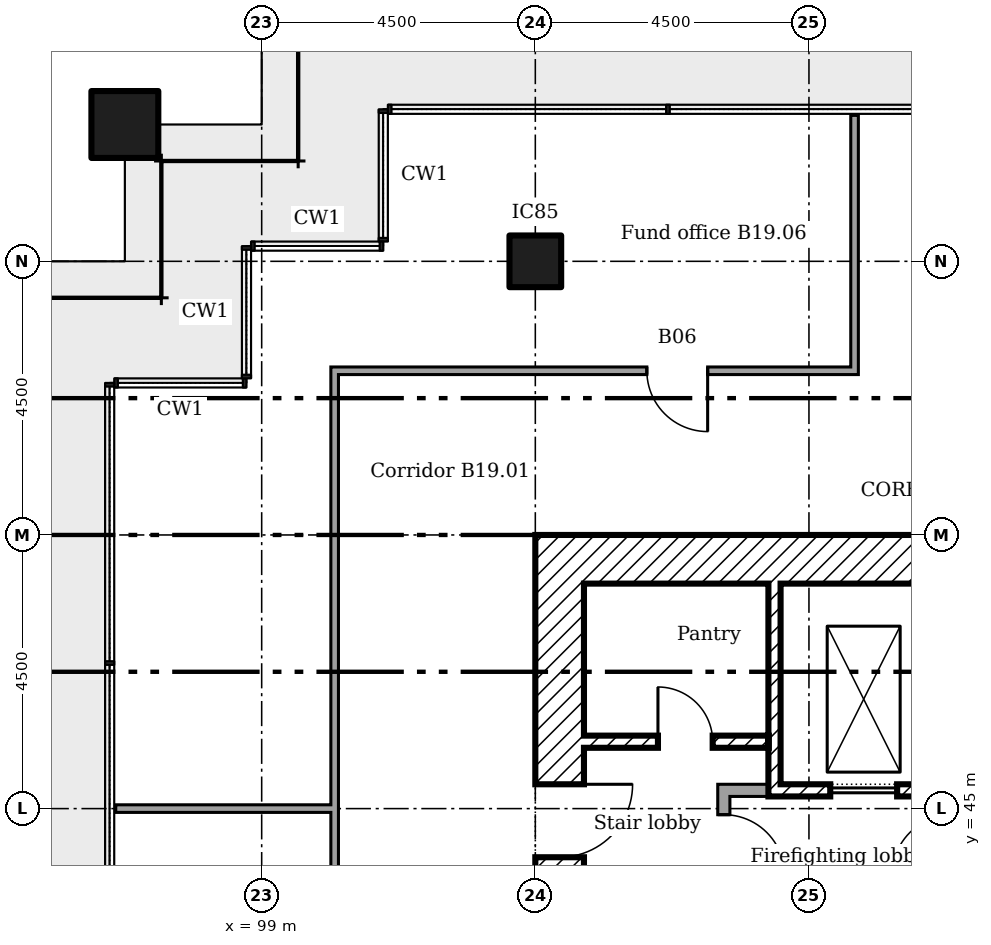
"""IFC4 building model, lengths in metres.
Left out: names, types, materials, properties, quantities, classifications, styles, units other than length and angle.
Written with IfcOpenShell. Run it as: python <this file> out.ifc"""

import sys

from ifc_helpers import new_model, si_unit, direction, frame, frame_2d, origin, origin_2d, place, context, subcontext, project, spatial, rectangle, extrude, element, fill, save


model = new_model("IFC4")
c1 = context("Model", 3, precision=1e-05, world=origin(), true_north=direction((0.0, 1.0)))
c2 = subcontext(c1, "Body", "Model", "MODEL_VIEW")
j1 = project(units=[si_unit("LENGTHUNIT", "METRE"), si_unit("PLANEANGLEUNIT", "RADIAN")], contexts=[c1])
p1 = place(None, origin())
s1 = spatial("IfcSite", under=j1, at=p1, CompositionType="ELEMENT")
p2 = place(p1, origin())
s2 = spatial("IfcBuilding", under=s1, at=p2, CompositionType="ELEMENT")
p3 = place(p2, frame((0.0, 0.0, 79.8)))
s3 = spatial("IfcBuildingStorey", under=s2, at=p3, CompositionType="ELEMENT", Elevation=79.8)
p4 = place(p3, frame((96.75, 56.25, 0.0)))
e1 = element("IfcColumn", 1, at=p4, inside=s3, PredefinedType="COLUMN", context=c2, shape_type="SweptSolid", body=[
    extrude(rectangle(XDim=1.1, YDim=1.1, at=origin_2d()), origin(), (0.0, 0.0, 1.0), 3.6),
])
p5 = place(p3, frame((103.5, 54.0, 0.0)))
e2 = element("IfcColumn", 2, at=p5, inside=s3, PredefinedType="COLUMN", context=c2, shape_type="SweptSolid", body=[
    extrude(rectangle(XDim=0.85, YDim=0.85, at=origin_2d()), origin(), (0.0, 0.0, 1.0), 3.6),
])
p6 = place(p3, frame((104.3, 49.1, 0.0)))
e3 = element("IfcWall", 3, at=p6, inside=s3, PredefinedType="SHEAR", context=c2, shape_type="SweptSolid", body=[
    extrude(rectangle(XDim=11.9, YDim=0.8, at=frame_2d((5.95, 0.0))), origin(), (0.0, 0.0, 1.0), 3.35),
])
p7 = place(p3, frame((103.9, 36.0, 0.0), z_axis=(0.0, 0.0, 1.0), x_axis=(0.0, 1.0, 0.0)))
e4 = element("IfcWall", 4, at=p7, inside=s3, PredefinedType="SHEAR", context=c2, shape_type="SweptSolid", body=[
    extrude(rectangle(XDim=13.5, YDim=0.8, at=frame_2d((6.75, 0.0))), origin(), (0.0, 0.0, 1.0), 3.35),
])
p8 = place(p7, frame((8.2, 0.0, 0.0)))
e5 = element("IfcOpeningElement", 5, at=p8, cuts=e4, PredefinedType="OPENING", context=c2, shape_type="SweptSolid", body=[
    extrude(rectangle(XDim=1.2, YDim=2.1, at=frame_2d((0.6, 1.05))), frame((0.0, 0.41, 0.0), z_axis=(0.0, -1.0, 0.0), x_axis=(1.0, 0.0, 0.0)), (0.0, 0.0, 1.0), 0.82),
])
p9 = place(p7, frame((6.225, 0.0, 0.0)))
e6 = element("IfcOpeningElement", 6, at=p9, cuts=e4, PredefinedType="OPENING", context=c2, shape_type="SweptSolid", body=[
    extrude(rectangle(XDim=1.0, YDim=2.1, at=frame_2d((0.5, 1.05))), frame((0.0, 0.41, 0.0), z_axis=(0.0, -1.0, 0.0), x_axis=(1.0, 0.0, 0.0)), (0.0, 0.0, 1.0), 0.82),
])
p10 = place(p3, frame((107.433, 48.7, 0.0), z_axis=(0.0, 0.0, 1.0), x_axis=(0.0, -1.0, 0.0)))
e7 = element("IfcWall", 7, at=p10, inside=s3, PredefinedType="SHEAR", context=c2, shape_type="SweptSolid", body=[
    extrude(rectangle(XDim=3.5, YDim=0.2, at=frame_2d((1.75, 0.0))), origin(), (0.0, 0.0, 1.0), 3.35),
])
p11 = place(p3, frame((106.5, 45.3, 0.0)))
e8 = element("IfcWall", 8, at=p11, inside=s3, PredefinedType="PARTITIONING", context=c2, shape_type="SweptSolid", body=[
    extrude(rectangle(XDim=0.833, YDim=0.2, at=frame_2d((0.417, 0.0))), origin(), (0.0, 0.0, 1.0), 3.35),
])
p12 = place(p3, frame((106.6, 43.7, 0.0), z_axis=(0.0, 0.0, 1.0), x_axis=(0.0, 1.0, 0.0)))
e9 = element("IfcWall", 9, at=p12, inside=s3, PredefinedType="PARTITIONING", context=c2, shape_type="SweptSolid", body=[
    extrude(rectangle(XDim=1.5, YDim=0.2, at=frame_2d((0.75, 0.0))), origin(), (0.0, 0.0, 1.0), 3.35),
])
p13 = place(p12, frame((0.2, 0.0, 0.0)))
e10 = element("IfcOpeningElement", 10, at=p13, cuts=e9, PredefinedType="OPENING", context=c2, shape_type="SweptSolid", body=[
    extrude(rectangle(XDim=1.0, YDim=2.1, at=frame_2d((0.5, 1.05))), frame((0.0, 0.11, 0.0), z_axis=(0.0, -1.0, 0.0), x_axis=(1.0, 0.0, 0.0)), (0.0, 0.0, 1.0), 0.22),
])
p14 = place(p3, frame((104.3, 46.1, 0.0)))
e11 = element("IfcWall", 11, at=p14, inside=s3, PredefinedType="SHEAR", context=c2, shape_type="SweptSolid", body=[
    extrude(rectangle(XDim=3.033, YDim=0.2, at=frame_2d((1.517, 0.0))), origin(), (0.0, 0.0, 1.0), 3.35),
])
p15 = place(p14, frame((1.217, 0.0, 0.0)))
e12 = element("IfcOpeningElement", 12, at=p15, cuts=e11, PredefinedType="OPENING", context=c2, shape_type="SweptSolid", body=[
    extrude(rectangle(XDim=0.9, YDim=2.1, at=frame_2d((0.45, 1.05))), frame((0.0, 0.11, 0.0), z_axis=(0.0, -1.0, 0.0), x_axis=(1.0, 0.0, 0.0)), (0.0, 0.0, 1.0), 0.22),
])
p16 = place(p3, frame((107.533, 45.3, 0.0)))
e13 = element("IfcWall", 13, at=p16, inside=s3, PredefinedType="SHEAR", context=c2, shape_type="SweptSolid", body=[
    extrude(rectangle(XDim=2.733, YDim=0.2, at=frame_2d((1.367, 0.0))), origin(), (0.0, 0.0, 1.0), 3.35),
])
p17 = place(p16, frame((0.817, 0.0, 0.0)))
e14 = element("IfcOpeningElement", 14, at=p17, cuts=e13, PredefinedType="OPENING", context=c2, shape_type="SweptSolid", body=[
    extrude(rectangle(XDim=1.1, YDim=2.1, at=frame_2d((0.55, 1.05))), frame((0.0, 0.11, 0.0), z_axis=(0.0, -1.0, 0.0), x_axis=(1.0, 0.0, 0.0)), (0.0, 0.0, 1.0), 0.22),
])
p18 = place(p3, frame((96.6, 45.0, 0.0)))
e15 = element("IfcWall", 15, at=p18, inside=s3, PredefinedType="PARTITIONING", context=c2, shape_type="SweptSolid", body=[
    extrude(rectangle(XDim=3.6, YDim=0.125, at=frame_2d((1.8, 0.0))), origin(), (0.0, 0.0, 1.0), 2.851),
])
p19 = place(p3, frame((100.137, 52.2, 0.0)))
e16 = element("IfcWall", 16, at=p19, inside=s3, PredefinedType="PARTITIONING", context=c2, shape_type="SweptSolid", body=[
    extrude(rectangle(XDim=8.675, YDim=0.125, at=frame_2d((4.337, 0.0))), origin(), (0.0, 0.0, 1.0), 3.45),
])
p20 = place(p19, frame((5.197, 0.0, 0.0)))
e17 = element("IfcOpeningElement", 17, at=p20, cuts=e16, PredefinedType="OPENING", context=c2, shape_type="SweptSolid", body=[
    extrude(rectangle(XDim=1.0, YDim=2.1, at=frame_2d((0.5, 1.05))), frame((0.0, 0.073, 0.0), z_axis=(0.0, -1.0, 0.0), x_axis=(1.0, 0.0, 0.0)), (0.0, 0.0, 1.0), 0.145),
])
p21 = place(p3, frame((100.2, 33.663, 0.0), z_axis=(0.0, 0.0, 1.0), x_axis=(0.0, 1.0, 0.0)))
e18 = element("IfcWall", 18, at=p21, inside=s3, PredefinedType="PARTITIONING", context=c2, shape_type="SweptSolid", body=[
    extrude(rectangle(XDim=18.475, YDim=0.125, at=frame_2d((9.237, 0.0))), origin(), (0.0, 0.0, 1.0), 3.45),
])
p22 = place(p21, frame((6.337, 0.0, 0.0)))
e19 = element("IfcOpeningElement", 19, at=p22, cuts=e18, PredefinedType="OPENING", context=c2, shape_type="SweptSolid", body=[
    extrude(rectangle(XDim=1.0, YDim=2.1, at=frame_2d((0.5, 1.05))), frame((0.0, 0.073, 0.0), z_axis=(0.0, -1.0, 0.0), x_axis=(1.0, 0.0, 0.0)), (0.0, 0.0, 1.0), 0.145),
])
p23 = place(p3, frame((108.75, 52.262, 0.0), z_axis=(0.0, 0.0, 1.0), x_axis=(0.0, 1.0, 0.0)))
e20 = element("IfcWall", 20, at=p23, inside=s3, PredefinedType="PARTITIONING", context=c2, shape_type="SweptSolid", body=[
    extrude(rectangle(XDim=4.137, YDim=0.125, at=frame_2d((2.069, 0.0))), origin(), (0.0, 0.0, 1.0), 3.45),
])
p24 = place(p8, frame((1.2, 0.0, 0.0), x_axis=(-1.0, 0.0, 0.0)))
e21 = element("IfcDoor", 21, at=p24, inside=s3, OperationType="SINGLE_SWING_RIGHT", PredefinedType="DOOR", context=c2, shape_type="SweptSolid", body=[
    extrude(rectangle(XDim=1.2, YDim=2.1, at=frame_2d((0.6, 1.05))), frame((0.0, 0.025, 0.0), z_axis=(0.0, -1.0, 0.0), x_axis=(1.0, 0.0, 0.0)), (0.0, 0.0, 1.0), 0.05),
])
fill(e5, e21)
p25 = place(p13, frame((1.0, 0.0, 0.0), x_axis=(-1.0, 0.0, 0.0)))
e22 = element("IfcDoor", 22, at=p25, inside=s3, OperationType="SINGLE_SWING_LEFT", PredefinedType="DOOR", context=c2, shape_type="SweptSolid", body=[
    extrude(rectangle(XDim=1.0, YDim=2.1, at=frame_2d((0.5, 1.05))), frame((0.0, 0.025, 0.0), z_axis=(0.0, -1.0, 0.0), x_axis=(1.0, 0.0, 0.0)), (0.0, 0.0, 1.0), 0.05),
])
fill(e10, e22)
p26 = place(p15, origin())
e23 = element("IfcDoor", 23, at=p26, inside=s3, OperationType="SINGLE_SWING_RIGHT", PredefinedType="DOOR", context=c2, shape_type="SweptSolid", body=[
    extrude(rectangle(XDim=0.9, YDim=2.1, at=frame_2d((0.45, 1.05))), frame((0.0, 0.025, 0.0), z_axis=(0.0, -1.0, 0.0), x_axis=(1.0, 0.0, 0.0)), (0.0, 0.0, 1.0), 0.05),
])
fill(e12, e23)
p27 = place(p17, origin())
e24 = element("IfcDoor", 24, at=p27, inside=s3, OperationType="SLIDING_TO_LEFT", PredefinedType="DOOR", context=c2, shape_type="SweptSolid", body=[
    extrude(rectangle(XDim=1.1, YDim=2.1, at=frame_2d((0.55, 1.05))), frame((0.0, 0.025, 0.0), z_axis=(0.0, -1.0, 0.0), x_axis=(1.0, 0.0, 0.0)), (0.0, 0.0, 1.0), 0.05),
])
fill(e14, e24)
p28 = place(p20, frame((1.0, 0.0, 0.0), x_axis=(-1.0, 0.0, 0.0)))
e25 = element("IfcDoor", 25, at=p28, inside=s3, OperationType="SINGLE_SWING_RIGHT", PredefinedType="DOOR", context=c2, shape_type="SweptSolid", body=[
    extrude(rectangle(XDim=1.0, YDim=2.1, at=frame_2d((0.5, 1.05))), frame((0.0, 0.025, 0.0), z_axis=(0.0, -1.0, 0.0), x_axis=(1.0, 0.0, 0.0)), (0.0, 0.0, 1.0), 0.05),
])
fill(e17, e25)
save(model, sys.argv[1])
